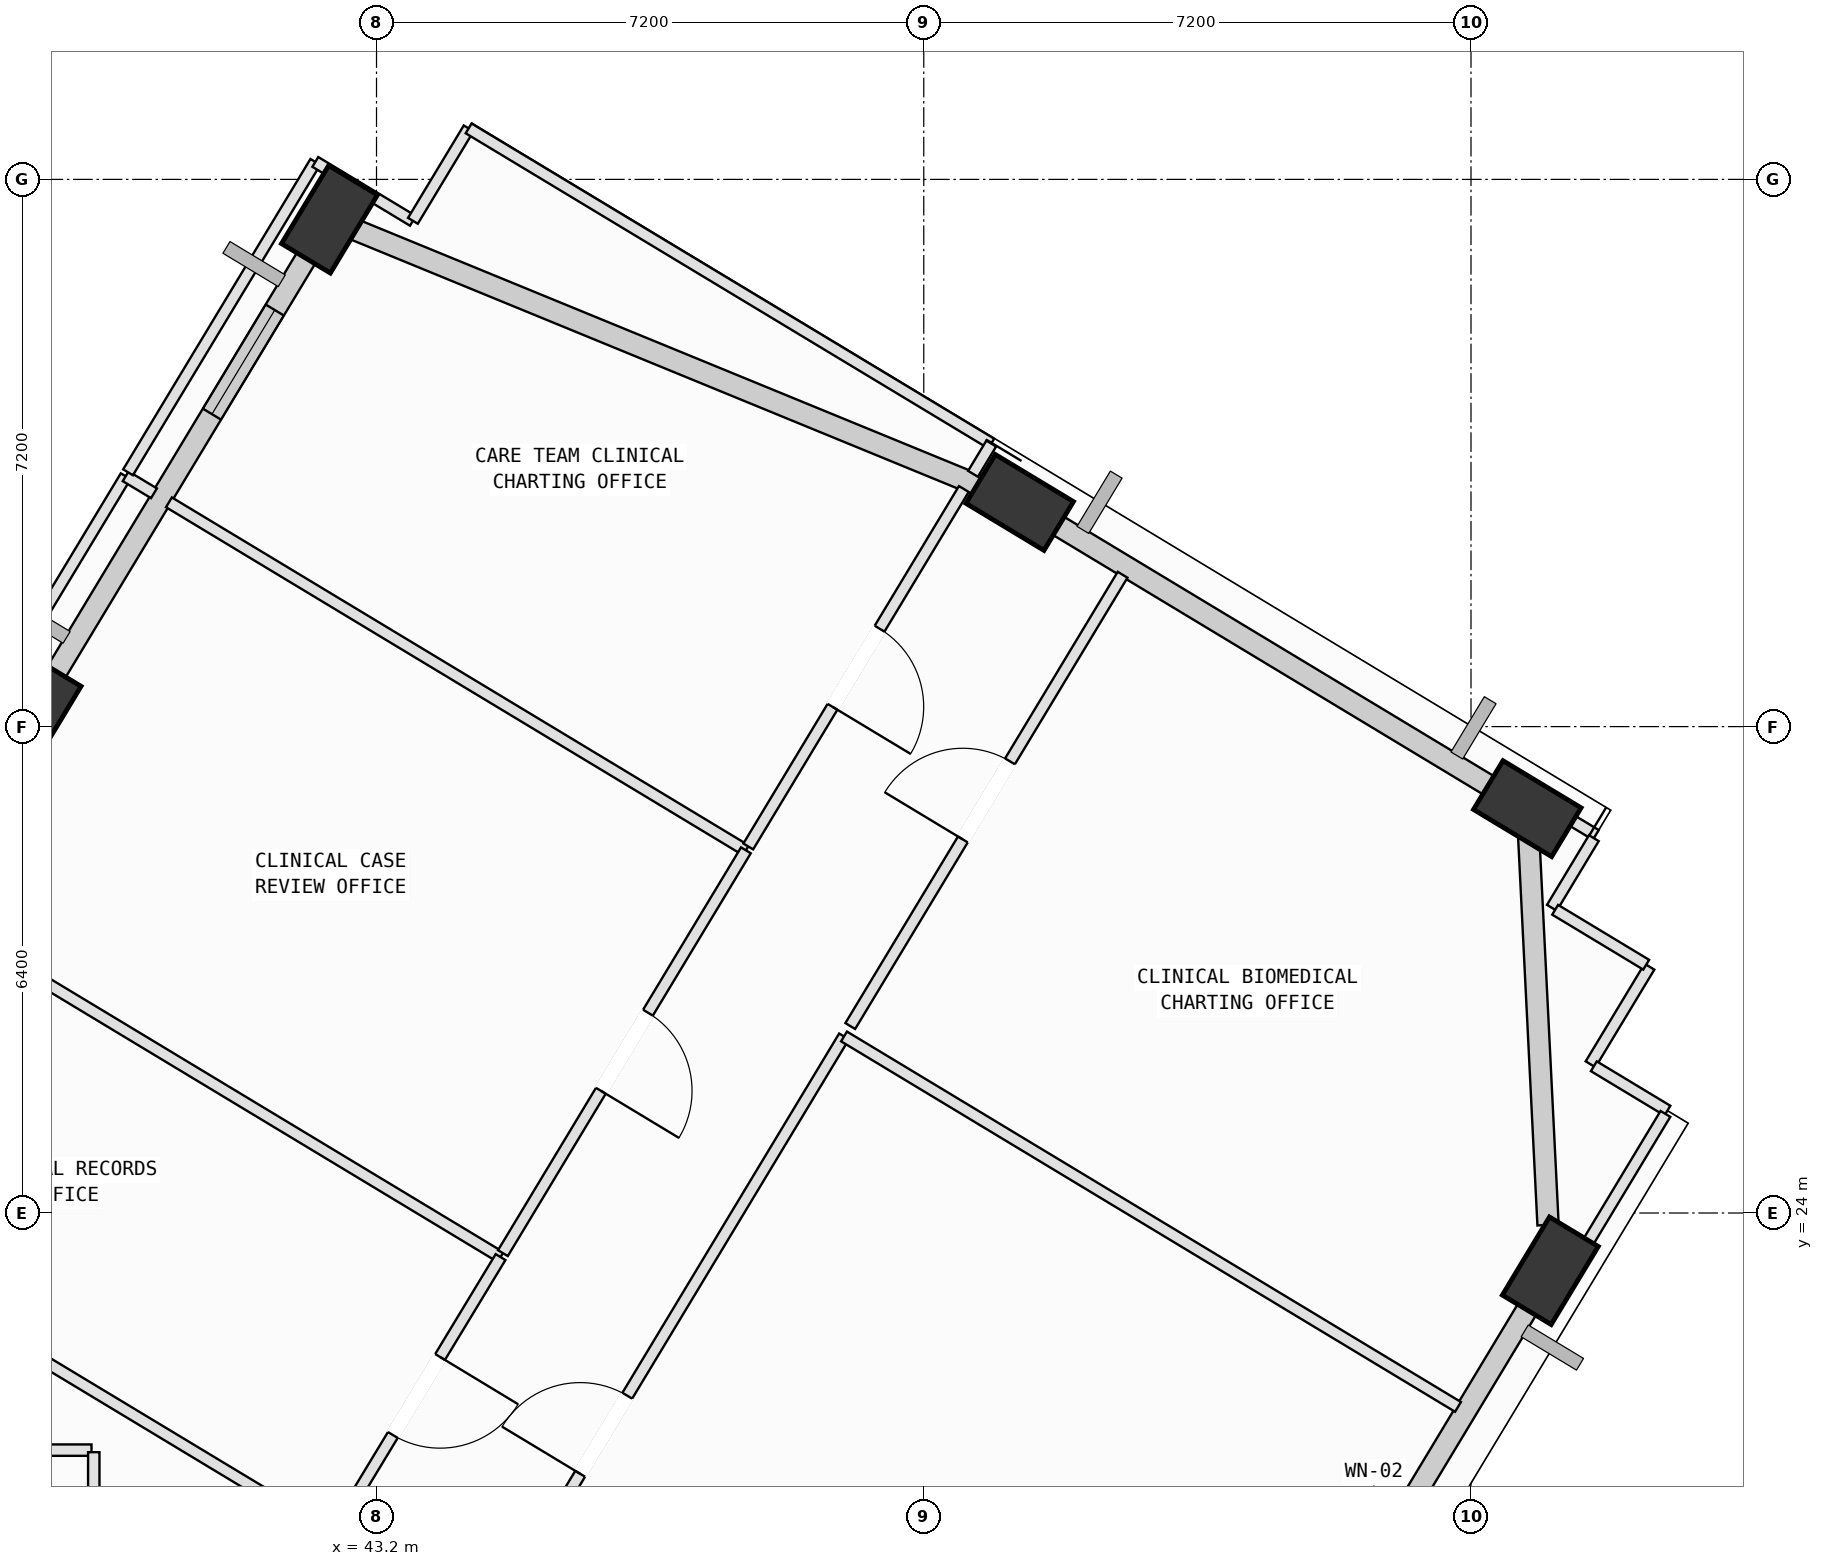
"""IFC4 building model, lengths in metres.
Left out: names, types, materials, properties, quantities, classifications, styles, units other than length and angle.
Written with IfcOpenShell. Run it as: python <this file> out.ifc"""

import sys

from ifc_helpers import new_model, si_unit, direction, frame, frame_2d, origin, origin_2d, place, context, subcontext, project, spatial, rectangle, extrude, element, fill, save


model = new_model("IFC4")
c1 = context("Model", 3, precision=1e-05, world=origin(), true_north=direction((0.0, 1.0)))
c2 = subcontext(c1, "Body", "Model", "MODEL_VIEW")
j1 = project(units=[si_unit("LENGTHUNIT", "METRE"), si_unit("PLANEANGLEUNIT", "RADIAN")], contexts=[c1])
p1 = place(None, origin())
s1 = spatial("IfcSite", under=j1, at=p1, CompositionType="ELEMENT")
p2 = place(p1, origin())
s2 = spatial("IfcBuilding", under=s1, at=p2, CompositionType="ELEMENT")
p3 = place(p2, frame((0.0, 0.0, 276.6)))
s3 = spatial("IfcBuildingStorey", under=s2, at=p3, CompositionType="ELEMENT", Elevation=276.6)
p4 = place(p3, frame((58.644, 23.24, 0.002), z_axis=(0.005590225413, 0.103297643506, 0.994634780322), x_axis=(-0.561801790444, -0.822515876559, 0.08857980053)))
e1 = element("IfcColumn", 1, at=p4, inside=s3, PredefinedType="COLUMN", context=c2, shape_type="SweptSolid", body=[
    extrude(rectangle(XDim=1.2, YDim=0.75, at=origin_2d()), origin(), (0.0, 0.0, 1.0), 4.018),
])
p5 = place(p3, frame((58.341, 29.32, 0.002), z_axis=(-0.019443798836, 0.101836896404, 0.994611072338), x_axis=(0.937423986975, -0.344047108781, 0.053552363012)))
e2 = element("IfcColumn", 2, at=p5, inside=s3, PredefinedType="COLUMN", context=c2, shape_type="SweptSolid", body=[
    extrude(rectangle(XDim=1.2, YDim=0.75, at=origin_2d()), origin(), (0.0, 0.0, 1.0), 4.018),
])
p6 = place(p3, frame((51.662, 33.349, 0.002), z_axis=(-0.035920849963, 0.074277011787, 0.996590496673), x_axis=(0.994972000752, -0.090633673349, 0.042617543034)))
e3 = element("IfcColumn", 3, at=p6, inside=s3, PredefinedType="COLUMN", context=c2, shape_type="SweptSolid", body=[
    extrude(rectangle(XDim=1.2, YDim=0.75, at=origin_2d()), origin(), (0.0, 0.0, 1.0), 4.01),
])
p7 = place(p3, frame((42.581, 37.075, 0.002), z_axis=(-0.051092925191, 0.036703986831, 0.998019203395), x_axis=(0.39268311078, -0.918094895724, 0.053867772867)))
e4 = element("IfcColumn", 4, at=p7, inside=s3, PredefinedType="COLUMN", context=c2, shape_type="SweptSolid", body=[
    extrude(rectangle(XDim=1.2, YDim=0.75, at=origin_2d()), origin(), (0.0, 0.0, 1.0), 4.004),
])
p8 = place(p3, frame((38.682, 30.61, 0.002), z_axis=(-0.024240744418, 0.020882454889, 0.999488023634), x_axis=(0.311279551422, -0.949923406253, 0.027396407041)))
e5 = element("IfcColumn", 5, at=p8, inside=s3, PredefinedType="COLUMN", context=c2, shape_type="SweptSolid", body=[
    extrude(rectangle(XDim=1.2, YDim=0.75, at=origin_2d()), origin(), (0.0, 0.0, 1.0), 3.998),
])
p9 = place(p3, frame((58.54, 23.067, 0.0), z_axis=(0.0, 0.0, 1.0), x_axis=(-0.51654717901, -0.856258729507, 0.0)))
e6 = element("IfcWall", 6, at=p9, inside=s3, PredefinedType="SOLIDWALL", context=c2, shape_type="SweptSolid", body=[
    extrude(rectangle(XDim=6.418, YDim=0.28, at=frame_2d((3.209, 0.0))), origin(), (0.0, 0.0, 1.0), 3.265),
])
p10 = place(p9, frame((3.293, 0.0, 0.75)))
e7 = element("IfcOpeningElement", 7, at=p10, cuts=e6, PredefinedType="OPENING", context=c2, shape_type="SweptSolid", body=[
    extrude(rectangle(XDim=2.0, YDim=1.95, at=frame_2d((1.0, 0.975))), frame((0.0, 0.15, 0.0), z_axis=(0.0, -1.0, 0.0), x_axis=(1.0, 0.0, 0.0)), (0.0, 0.0, 1.0), 0.3),
])
p11 = place(p3, frame((58.35, 29.13, 0.0), z_axis=(0.0, 0.0, 1.0), x_axis=(0.049760507536, -0.998761178606, 0.0)))
e8 = element("IfcWall", 8, at=p11, inside=s3, PredefinedType="SOLIDWALL", context=c2, shape_type="SweptSolid", body=[
    extrude(rectangle(XDim=5.294, YDim=0.28, at=frame_2d((2.647, 0.0))), origin(), (0.0, 0.0, 1.0), 3.265),
])
p12 = place(p3, frame((51.875, 33.221, 0.0), z_axis=(0.0, 0.0, 1.0), x_axis=(0.856264551428, -0.516537528131, 0.0)))
e9 = element("IfcWall", 9, at=p12, inside=s3, PredefinedType="SOLIDWALL", context=c2, shape_type="SweptSolid", body=[
    extrude(rectangle(XDim=7.046, YDim=0.28, at=frame_2d((3.523, 0.0))), origin(), (0.0, 0.0, 1.0), 3.265),
])
p13 = place(p3, frame((42.835, 36.971, 0.0), z_axis=(0.0, 0.0, 1.0), x_axis=(0.925149642296, -0.379602607157, 0.0)))
e10 = element("IfcWall", 10, at=p13, inside=s3, PredefinedType="SOLIDWALL", context=c2, shape_type="SweptSolid", body=[
    extrude(rectangle(XDim=9.036, YDim=0.28, at=frame_2d((4.518, 0.0))), origin(), (0.0, 0.0, 1.0), 3.265),
])
p14 = place(p3, frame((38.89, 30.956, 0.0), z_axis=(0.0, 0.0, 1.0), x_axis=(0.516522507193, 0.856273612558, 0.0)))
e11 = element("IfcWall", 11, at=p14, inside=s3, PredefinedType="SOLIDWALL", context=c2, shape_type="SweptSolid", body=[
    extrude(rectangle(XDim=6.78, YDim=0.28, at=frame_2d((3.39, 0.0))), origin(), (0.0, 0.0, 1.0), 3.265),
])
p15 = place(p14, frame((4.153, 0.0, 0.75)))
e12 = element("IfcOpeningElement", 12, at=p15, cuts=e11, PredefinedType="OPENING", context=c2, shape_type="SweptSolid", body=[
    extrude(rectangle(XDim=1.6, YDim=1.95, at=frame_2d((0.8, 0.975))), frame((0.0, 0.15, 0.0), z_axis=(0.0, -1.0, 0.0), x_axis=(1.0, 0.0, 0.0)), (0.0, 0.0, 1.0), 0.3),
])
p16 = place(p3, frame((43.028, 15.842, 0.0), z_axis=(0.0, 0.0, 1.0), x_axis=(0.516562112888, 0.856249720309, 0.0)))
e13 = element("IfcWall", 13, at=p16, inside=s3, PredefinedType="PARTITIONING", context=c2, shape_type="SweptSolid", body=[
    extrude(rectangle(XDim=12.24, YDim=0.15, at=frame_2d((6.12, 0.0))), origin(), (0.0, 0.0, 1.0), 3.415),
])
p17 = place(p16, frame((5.52, 0.0, 0.0)))
e14 = element("IfcOpeningElement", 14, at=p17, cuts=e13, PredefinedType="OPENING", context=c2, shape_type="SweptSolid", body=[
    extrude(rectangle(XDim=1.2, YDim=2.15, at=frame_2d((0.6, 1.075))), frame((0.0, 0.085, 0.0), z_axis=(0.0, -1.0, 0.0), x_axis=(1.0, 0.0, 0.0)), (0.0, 0.0, 1.0), 0.17),
])
p18 = place(p3, frame((49.351, 26.323, 0.0), z_axis=(0.0, 0.0, 1.0), x_axis=(0.856213909792, -0.516621467497, 0.0)))
e15 = element("IfcWall", 15, at=p18, inside=s3, PredefinedType="PARTITIONING", context=c2, shape_type="SweptSolid", body=[
    extrude(rectangle(XDim=9.434, YDim=0.15, at=frame_2d((4.717, 0.0))), origin(), (0.0, 0.0, 1.0), 3.78),
])
p19 = place(p3, frame((59.948, 27.241, 0.0), z_axis=(0.0, 0.0, 1.0), x_axis=(-0.516720521712, -0.856154134746, 0.0)))
e16 = element("IfcWall", 16, at=p19, inside=s3, PredefinedType="PARTITIONING", context=c2, shape_type="SweptSolid", body=[
    extrude(rectangle(XDim=1.5, YDim=0.15, at=frame_2d((0.75, 0.0))), origin(), (0.0, 0.0, 1.0), 3.78),
])
p20 = place(p3, frame((59.216, 25.931, 0.0), z_axis=(0.0, 0.0, 1.0), x_axis=(0.856251889628, -0.516558517022, 0.0)))
e17 = element("IfcWall", 17, at=p20, inside=s3, PredefinedType="PARTITIONING", context=c2, shape_type="SweptSolid", body=[
    extrude(rectangle(XDim=1.131, YDim=0.15, at=frame_2d((0.565, 0.0))), origin(), (0.0, 0.0, 1.0), 3.78),
])
p21 = place(p3, frame((60.158, 25.304, 0.0), z_axis=(0.0, 0.0, 1.0), x_axis=(-0.516451858287, -0.85631622551, 0.0)))
e18 = element("IfcWall", 18, at=p21, inside=s3, PredefinedType="PARTITIONING", context=c2, shape_type="SweptSolid", body=[
    extrude(rectangle(XDim=2.751, YDim=0.15, at=frame_2d((1.375, 0.0))), origin(), (0.0, 0.0, 1.0), 3.265),
])
p22 = place(p3, frame((49.433, 26.46, 0.0), z_axis=(0.0, 0.0, 1.0), x_axis=(0.516637382187, 0.856204307001, 0.0)))
e19 = element("IfcWall", 19, at=p22, inside=s3, PredefinedType="PARTITIONING", context=c2, shape_type="SweptSolid", body=[
    extrude(rectangle(XDim=6.935, YDim=0.15, at=frame_2d((3.468, 0.0))), origin(), (0.0, 0.0, 1.0), 3.78),
])
p23 = place(p22, frame((2.868, 0.0, 0.0)))
e20 = element("IfcOpeningElement", 20, at=p23, cuts=e19, PredefinedType="OPENING", context=c2, shape_type="SweptSolid", body=[
    extrude(rectangle(XDim=1.2, YDim=2.15, at=frame_2d((0.6, 1.075))), frame((0.0, 0.085, 0.0), z_axis=(0.0, -1.0, 0.0), x_axis=(1.0, 0.0, 0.0)), (0.0, 0.0, 1.0), 0.17),
])
p24 = place(p3, frame((57.996, 29.727, 0.0), z_axis=(0.0, 0.0, 1.0), x_axis=(0.856142872217, -0.516739182134, 0.0)))
e21 = element("IfcWall", 21, at=p24, inside=s3, PredefinedType="PARTITIONING", context=c2, shape_type="SweptSolid", body=[
    extrude(rectangle(XDim=1.455, YDim=0.15, at=frame_2d((0.728, 0.0))), origin(), (0.0, 0.0, 1.0), 3.265),
])
p25 = place(p3, frame((59.216, 28.932, 0.0), z_axis=(0.0, 0.0, 1.0), x_axis=(-0.516240696379, -0.856443543616, 0.0)))
e22 = element("IfcWall", 22, at=p25, inside=s3, PredefinedType="PARTITIONING", context=c2, shape_type="SweptSolid", body=[
    extrude(rectangle(XDim=1.069, YDim=0.15, at=frame_2d((0.535, 0.0))), origin(), (0.0, 0.0, 1.0), 3.78),
])
p26 = place(p3, frame((58.707, 27.99, 0.0), z_axis=(0.0, 0.0, 1.0), x_axis=(0.856196976415, -0.516649530704, 0.0)))
e23 = element("IfcWall", 23, at=p26, inside=s3, PredefinedType="PARTITIONING", context=c2, shape_type="SweptSolid", body=[
    extrude(rectangle(XDim=1.399, YDim=0.15, at=frame_2d((0.7, 0.0))), origin(), (0.0, 0.0, 1.0), 3.78),
])
p27 = place(p3, frame((39.45, 20.88, 0.0), z_axis=(0.0, 0.0, 1.0), x_axis=(-1.0, 0.0, 0.0)))
e24 = element("IfcWall", 24, at=p27, inside=s3, PredefinedType="PARTITIONING", context=c2, shape_type="SweptSolid", body=[
    extrude(rectangle(XDim=6.504, YDim=0.15, at=frame_2d((3.252, 0.0))), origin(), (0.0, 0.0, 1.0), 3.415),
])
p28 = place(p27, frame((2.652, 0.0, 0.0)))
e25 = element("IfcOpeningElement", 25, at=p28, cuts=e24, PredefinedType="OPENING", context=c2, shape_type="SweptSolid", body=[
    extrude(rectangle(XDim=1.2, YDim=2.15, at=frame_2d((0.6, 1.075))), frame((0.0, 0.085, 0.0), z_axis=(0.0, -1.0, 0.0), x_axis=(1.0, 0.0, 0.0)), (0.0, 0.0, 1.0), 0.17),
])
p29 = place(p3, frame((34.464, 24.684, 0.0), z_axis=(0.0, 0.0, 1.0), x_axis=(0.856284272725, -0.516504834714, 0.0)))
e26 = element("IfcWall", 26, at=p29, inside=s3, PredefinedType="PARTITIONING", context=c2, shape_type="SweptSolid", body=[
    extrude(rectangle(XDim=9.5, YDim=0.15, at=frame_2d((4.75, 0.0))), origin(), (0.0, 0.0, 1.0), 3.78),
])
p30 = place(p3, frame((39.48, 14.607, 0.0), z_axis=(0.0, 0.0, 1.0), x_axis=(0.0, 1.0, 0.0)))
e27 = element("IfcWall", 27, at=p30, inside=s3, PredefinedType="PARTITIONING", context=c2, shape_type="SweptSolid", body=[
    extrude(rectangle(XDim=6.246, YDim=0.15, at=frame_2d((3.123, 0.0))), origin(), (0.0, 0.0, 1.0), 3.78),
])
p31 = place(p3, frame((37.241, 27.999, 0.0), z_axis=(0.0, 0.0, 1.0), x_axis=(0.856273135167, -0.516523298594, 0.0)))
e28 = element("IfcWall", 28, at=p31, inside=s3, PredefinedType="PARTITIONING", context=c2, shape_type="SweptSolid", body=[
    extrude(rectangle(XDim=8.865, YDim=0.15, at=frame_2d((4.433, 0.0))), origin(), (0.0, 0.0, 1.0), 3.78),
])
p32 = place(p3, frame((44.832, 23.42, 0.0), z_axis=(0.0, 0.0, 1.0), x_axis=(-0.517953436176, -0.855408813348, 0.0)))
e29 = element("IfcWall", 29, at=p32, inside=s3, PredefinedType="PARTITIONING", context=c2, shape_type="SweptSolid", body=[
    extrude(rectangle(XDim=4.273, YDim=0.15, at=frame_2d((2.136, 0.0))), origin(), (0.0, 0.0, 1.0), 3.78),
])
p33 = place(p32, frame((1.536, 0.0, 0.0)))
e30 = element("IfcOpeningElement", 30, at=p33, cuts=e29, PredefinedType="OPENING", context=c2, shape_type="SweptSolid", body=[
    extrude(rectangle(XDim=1.2, YDim=2.15, at=frame_2d((0.6, 1.075))), frame((0.0, 0.085, 0.0), z_axis=(0.0, -1.0, 0.0), x_axis=(1.0, 0.0, 0.0)), (0.0, 0.0, 1.0), 0.17),
])
p34 = place(p3, frame((36.702, 28.394, 0.0), z_axis=(0.0, 0.0, 1.0), x_axis=(0.51662857817, 0.856209619321, 0.0)))
e31 = element("IfcWall", 31, at=p34, inside=s3, PredefinedType="PARTITIONING", context=c2, shape_type="SweptSolid", body=[
    extrude(rectangle(XDim=6.19, YDim=0.15, at=frame_2d((3.095, 0.0))), origin(), (0.0, 0.0, 1.0), 3.265),
])
p35 = place(p3, frame((39.9, 33.694, 0.0), z_axis=(0.0, 0.0, 1.0), x_axis=(0.856598931091, -0.515982820696, 0.0)))
e32 = element("IfcWall", 32, at=p35, inside=s3, PredefinedType="PARTITIONING", context=c2, shape_type="SweptSolid", body=[
    extrude(rectangle(XDim=0.434, YDim=0.15, at=frame_2d((0.217, 0.0))), origin(), (0.0, 0.0, 1.0), 3.78),
])
p36 = place(p3, frame((40.469, 33.351, 0.0), z_axis=(0.0, 0.0, 1.0), x_axis=(0.856273135167, -0.516523298594, 0.0)))
e33 = element("IfcWall", 33, at=p36, inside=s3, PredefinedType="PARTITIONING", context=c2, shape_type="SweptSolid", body=[
    extrude(rectangle(XDim=8.865, YDim=0.15, at=frame_2d((4.433, 0.0))), origin(), (0.0, 0.0, 1.0), 3.78),
])
p37 = place(p3, frame((48.06, 28.772, 0.0), z_axis=(0.0, 0.0, 1.0), x_axis=(-0.516512910077, -0.85627940167, 0.0)))
e34 = element("IfcWall", 34, at=p37, inside=s3, PredefinedType="PARTITIONING", context=c2, shape_type="SweptSolid", body=[
    extrude(rectangle(XDim=6.19, YDim=0.15, at=frame_2d((3.095, 0.0))), origin(), (0.0, 0.0, 1.0), 3.78),
])
p38 = place(p37, frame((2.495, 0.0, 0.0)))
e35 = element("IfcOpeningElement", 35, at=p38, cuts=e34, PredefinedType="OPENING", context=c2, shape_type="SweptSolid", body=[
    extrude(rectangle(XDim=1.2, YDim=2.15, at=frame_2d((0.6, 1.075))), frame((0.0, 0.085, 0.0), z_axis=(0.0, -1.0, 0.0), x_axis=(1.0, 0.0, 0.0)), (0.0, 0.0, 1.0), 0.17),
])
p39 = place(p3, frame((39.931, 33.746, 0.0), z_axis=(0.0, 0.0, 1.0), x_axis=(0.516609331503, 0.856221232278, 0.0)))
e36 = element("IfcWall", 36, at=p39, inside=s3, PredefinedType="PARTITIONING", context=c2, shape_type="SweptSolid", body=[
    extrude(rectangle(XDim=4.77, YDim=0.15, at=frame_2d((2.385, 0.0))), origin(), (0.0, 0.0, 1.0), 3.265),
])
p40 = place(p3, frame((42.395, 37.83, 0.0), z_axis=(0.0, 0.0, 1.0), x_axis=(0.856082111936, -0.516839837497, 0.0)))
e37 = element("IfcWall", 37, at=p40, inside=s3, PredefinedType="PARTITIONING", context=c2, shape_type="SweptSolid", body=[
    extrude(rectangle(XDim=1.5, YDim=0.15, at=frame_2d((0.75, 0.0))), origin(), (0.0, 0.0, 1.0), 3.265),
])
p41 = place(p3, frame((43.679, 37.055, 0.0), z_axis=(0.0, 0.0, 1.0), x_axis=(0.516315063956, 0.856398712477, 0.0)))
e38 = element("IfcWall", 38, at=p41, inside=s3, PredefinedType="PARTITIONING", context=c2, shape_type="SweptSolid", body=[
    extrude(rectangle(XDim=1.42, YDim=0.15, at=frame_2d((0.71, 0.0))), origin(), (0.0, 0.0, 1.0), 3.78),
])
p42 = place(p3, frame((44.412, 38.271, 0.0), z_axis=(0.0, 0.0, 1.0), x_axis=(0.856315640281, -0.51645282864, 0.0)))
e39 = element("IfcWall", 39, at=p42, inside=s3, PredefinedType="PARTITIONING", context=c2, shape_type="SweptSolid", body=[
    extrude(rectangle(XDim=8.03, YDim=0.15, at=frame_2d((4.015, 0.0))), origin(), (0.0, 0.0, 1.0), 3.265),
])
p43 = place(p3, frame((51.288, 34.124, 0.0), z_axis=(0.0, 0.0, 1.0), x_axis=(-0.516425909751, -0.856331874765, 0.0)))
e40 = element("IfcWall", 40, at=p43, inside=s3, PredefinedType="PARTITIONING", context=c2, shape_type="SweptSolid", body=[
    extrude(rectangle(XDim=0.465, YDim=0.15, at=frame_2d((0.232, 0.0))), origin(), (0.0, 0.0, 1.0), 3.78),
])
p44 = place(p3, frame((50.927, 33.526, 0.0), z_axis=(0.0, 0.0, 1.0), x_axis=(-0.516396929878, -0.856349350915, 0.0)))
e41 = element("IfcWall", 41, at=p44, inside=s3, PredefinedType="PARTITIONING", context=c2, shape_type="SweptSolid", body=[
    extrude(rectangle(XDim=5.492, YDim=0.15, at=frame_2d((2.746, 0.0))), origin(), (0.0, 0.0, 1.0), 3.78),
])
p45 = place(p44, frame((2.146, 0.0, 0.0)))
e42 = element("IfcOpeningElement", 42, at=p45, cuts=e41, PredefinedType="OPENING", context=c2, shape_type="SweptSolid", body=[
    extrude(rectangle(XDim=1.2, YDim=2.15, at=frame_2d((0.6, 1.075))), frame((0.0, 0.085, 0.0), z_axis=(0.0, -1.0, 0.0), x_axis=(1.0, 0.0, 0.0)), (0.0, 0.0, 1.0), 0.17),
])
p46 = place(p15, origin())
e43 = element("IfcWindow", 43, at=p46, inside=s3, PartitioningType="SINGLE_PANEL", PredefinedType="WINDOW", context=c2, shape_type="SweptSolid", body=[
    extrude(rectangle(XDim=1.6, YDim=1.95, at=frame_2d((0.8, 0.975))), frame((0.0, 0.03, 0.0), z_axis=(0.0, -1.0, 0.0), x_axis=(1.0, 0.0, 0.0)), (0.0, 0.0, 1.0), 0.06),
])
fill(e12, e43)
p47 = place(p17, origin())
e44 = element("IfcDoor", 44, at=p47, inside=s3, OperationType="SINGLE_SWING_LEFT", PredefinedType="DOOR", context=c2, shape_type="SweptSolid", body=[
    extrude(rectangle(XDim=1.2, YDim=2.15, at=frame_2d((0.6, 1.075))), frame((0.0, 0.025, 0.0), z_axis=(0.0, -1.0, 0.0), x_axis=(1.0, 0.0, 0.0)), (0.0, 0.0, 1.0), 0.05),
])
fill(e14, e44)
p48 = place(p23, origin())
e45 = element("IfcDoor", 45, at=p48, inside=s3, OperationType="SINGLE_SWING_LEFT", PredefinedType="DOOR", context=c2, shape_type="SweptSolid", body=[
    extrude(rectangle(XDim=1.2, YDim=2.15, at=frame_2d((0.6, 1.075))), frame((0.0, 0.025, 0.0), z_axis=(0.0, -1.0, 0.0), x_axis=(1.0, 0.0, 0.0)), (0.0, 0.0, 1.0), 0.05),
])
fill(e20, e45)
p49 = place(p33, origin())
e46 = element("IfcDoor", 46, at=p49, inside=s3, OperationType="SINGLE_SWING_LEFT", PredefinedType="DOOR", context=c2, shape_type="SweptSolid", body=[
    extrude(rectangle(XDim=1.2, YDim=2.15, at=frame_2d((0.6, 1.075))), frame((0.0, 0.025, 0.0), z_axis=(0.0, -1.0, 0.0), x_axis=(1.0, 0.0, 0.0)), (0.0, 0.0, 1.0), 0.05),
])
fill(e30, e46)
p50 = place(p38, origin())
e47 = element("IfcDoor", 47, at=p50, inside=s3, OperationType="SINGLE_SWING_RIGHT", PredefinedType="DOOR", context=c2, shape_type="SweptSolid", body=[
    extrude(rectangle(XDim=1.2, YDim=2.15, at=frame_2d((0.6, 1.075))), frame((0.0, 0.025, 0.0), z_axis=(0.0, -1.0, 0.0), x_axis=(1.0, 0.0, 0.0)), (0.0, 0.0, 1.0), 0.05),
])
fill(e35, e47)
p51 = place(p45, origin())
e48 = element("IfcDoor", 48, at=p51, inside=s3, OperationType="SINGLE_SWING_RIGHT", PredefinedType="DOOR", context=c2, shape_type="SweptSolid", body=[
    extrude(rectangle(XDim=1.2, YDim=2.15, at=frame_2d((0.6, 1.075))), frame((0.0, 0.025, 0.0), z_axis=(0.0, -1.0, 0.0), x_axis=(1.0, 0.0, 0.0)), (0.0, 0.0, 1.0), 0.05),
])
fill(e42, e48)
save(model, sys.argv[1])
